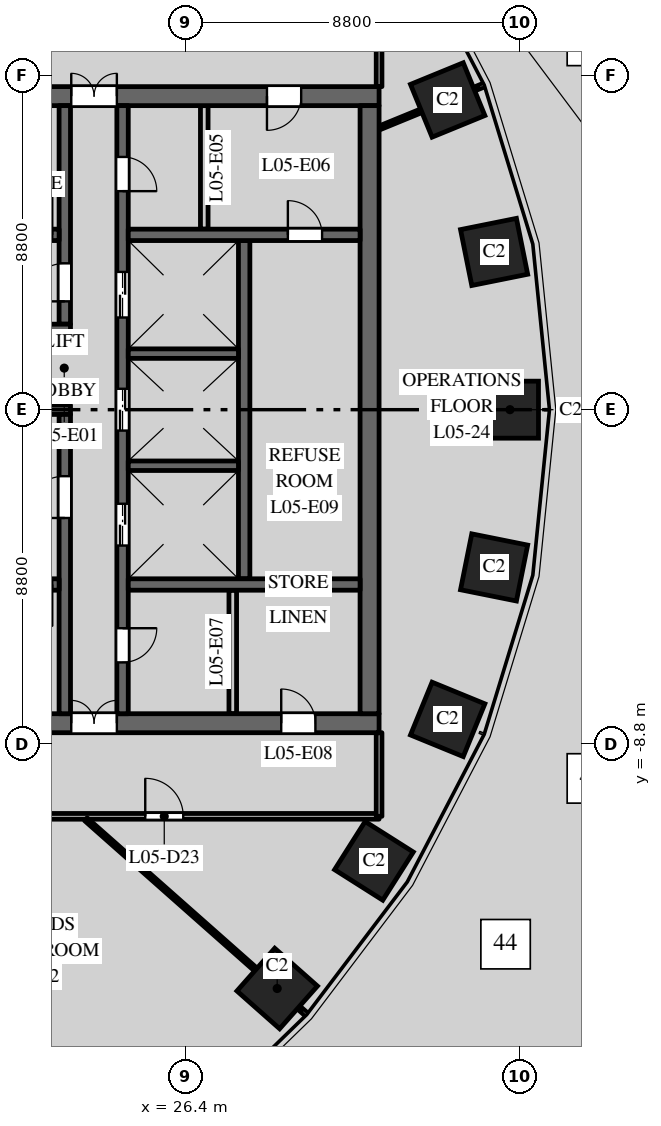
"""IFC4 building model, lengths in metres.
Left out: names, types, materials, properties, quantities, classifications, styles, units other than length and angle.
Written with IfcOpenShell. Run it as: python <this file> out.ifc"""

import sys

from ifc_helpers import new_model, si_unit, direction, frame, frame_2d, origin, origin_2d, place, context, subcontext, project, spatial, rectangle, extrude, element, fill, save


model = new_model("IFC4")
c1 = context("Model", 3, precision=1e-05, world=origin(), true_north=direction((0.0, 1.0)))
c2 = subcontext(c1, "Body", "Model", "MODEL_VIEW")
j1 = project(units=[si_unit("LENGTHUNIT", "METRE"), si_unit("PLANEANGLEUNIT", "RADIAN")], contexts=[c1])
p1 = place(None, origin())
s1 = spatial("IfcSite", under=j1, at=p1, CompositionType="ELEMENT")
p2 = place(p1, origin())
s2 = spatial("IfcBuilding", under=s1, at=p2, CompositionType="ELEMENT")
p3 = place(p2, frame((0.0, 0.0, 30.5)))
s3 = spatial("IfcBuildingStorey", under=s2, at=p3, CompositionType="ELEMENT", Elevation=30.5)
for number, where, z_axis, x_axis in (
    (1, (34.945, 0.0, 0.0), (0.0, 0.0, 1.0), (0.0, 1.0, 0.0)),
    (2, (34.527, 4.151, 0.0), (0.0, 0.0, 1.0), (-0.197, 0.98, 0.0)),
    (3, (33.305, 8.149, 0.0), (0.0, 0.0, 1.0), (-0.379, 0.925, 0.0)),
    (4, (28.819, -15.23, 0.0), (0.0, 0.0, 1.0), (0.663, 0.749, 0.0)),
    (5, (31.365, -11.871, 0.0), (0.0, 0.0, 1.0), (0.535, 0.845, 0.0)),
    (6, (33.305, -8.149, 0.0), (0.0, 0.0, 1.0), (0.379, 0.925, 0.0)),
    (7, (34.527, -4.151, 0.0), (0.0, 0.0, 1.0), (0.197, 0.98, 0.0)),
):
    element("IfcColumn", number, at=place(p3, frame(where, z_axis=z_axis, x_axis=x_axis)), inside=s3, PredefinedType="COLUMN", context=c2, shape_type="SweptSolid", body=[
        extrude(rectangle(XDim=1.5, YDim=1.5, at=origin_2d()), origin(), (0.0, 0.0, 1.0), 4.0),
    ])
p4 = place(p3, frame((16.5, 8.25, 0.0), z_axis=(0.0, 0.0, 1.0), x_axis=(1.0, 0.0, 0.0)))
e8 = element("IfcWall", 8, at=p4, inside=s3, PredefinedType="SHEAR", context=c2, shape_type="SweptSolid", body=[
    extrude(rectangle(XDim=15.0, YDim=0.5, at=frame_2d((7.5, 0.0))), origin(), (0.0, 0.0, 1.0), 3.7),
])
p5 = place(p4, frame((6.9, 0.0, 0.0)))
e9 = element("IfcOpeningElement", 9, at=p5, cuts=e8, PredefinedType="OPENING", context=c2, shape_type="SweptSolid", body=[
    extrude(rectangle(XDim=1.2, YDim=2.1, at=frame_2d((0.6, 1.05))), frame((0.0, 0.26, 0.0), z_axis=(0.0, -1.0, 0.0), x_axis=(1.0, 0.0, 0.0)), (0.0, 0.0, 1.0), 0.52),
])
p6 = place(p4, frame((12.05, 0.0, 0.0)))
e10 = element("IfcOpeningElement", 10, at=p6, cuts=e8, PredefinedType="OPENING", context=c2, shape_type="SweptSolid", body=[
    extrude(rectangle(XDim=0.9, YDim=2.1, at=frame_2d((0.45, 1.05))), frame((0.0, 0.26, 0.0), z_axis=(0.0, -1.0, 0.0), x_axis=(1.0, 0.0, 0.0)), (0.0, 0.0, 1.0), 0.52),
])
p7 = place(p3, frame((16.5, -8.25, 0.0), z_axis=(0.0, 0.0, 1.0), x_axis=(1.0, 0.0, 0.0)))
e11 = element("IfcWall", 11, at=p7, inside=s3, PredefinedType="SHEAR", context=c2, shape_type="SweptSolid", body=[
    extrude(rectangle(XDim=15.0, YDim=0.5, at=frame_2d((7.5, 0.0))), origin(), (0.0, 0.0, 1.0), 3.7),
])
p8 = place(p7, frame((6.9, 0.0, 0.0)))
e12 = element("IfcOpeningElement", 12, at=p8, cuts=e11, PredefinedType="OPENING", context=c2, shape_type="SweptSolid", body=[
    extrude(rectangle(XDim=1.2, YDim=2.1, at=frame_2d((0.6, 1.05))), frame((0.0, 0.26, 0.0), z_axis=(0.0, -1.0, 0.0), x_axis=(1.0, 0.0, 0.0)), (0.0, 0.0, 1.0), 0.52),
])
p9 = place(p7, frame((12.425, 0.0, 0.0)))
e13 = element("IfcOpeningElement", 13, at=p9, cuts=e11, PredefinedType="OPENING", context=c2, shape_type="SweptSolid", body=[
    extrude(rectangle(XDim=0.9, YDim=2.1, at=frame_2d((0.45, 1.05))), frame((0.0, 0.26, 0.0), z_axis=(0.0, -1.0, 0.0), x_axis=(1.0, 0.0, 0.0)), (0.0, 0.0, 1.0), 0.52),
])
p10 = place(p3, frame((27.95, -4.45, 0.0), z_axis=(0.0, 0.0, 1.0), x_axis=(0.0, 1.0, 0.0)))
e14 = element("IfcWall", 14, at=p10, inside=s3, PredefinedType="SHEAR", context=c2, shape_type="SweptSolid", body=[
    extrude(rectangle(XDim=8.9, YDim=0.3, at=frame_2d((4.45, 0.0))), origin(), (0.0, 0.0, 1.0), 3.7),
])
p11 = place(p3, frame((24.75, -8.0, 0.0), z_axis=(0.0, 0.0, 1.0), x_axis=(0.0, 1.0, 0.0)))
e15 = element("IfcWall", 15, at=p11, inside=s3, PredefinedType="SHEAR", context=c2, shape_type="SweptSolid", body=[
    extrude(rectangle(XDim=16.0, YDim=0.3, at=frame_2d((8.0, 0.0))), origin(), (0.0, 0.0, 1.0), 3.7),
])
p12 = place(p11, frame((4.425, 0.0, 0.0)))
e16 = element("IfcOpeningElement", 16, at=p12, cuts=e15, PredefinedType="OPENING", context=c2, shape_type="SweptSolid", body=[
    extrude(rectangle(XDim=1.1, YDim=2.1, at=frame_2d((0.55, 1.05))), frame((0.0, 0.16, 0.0), z_axis=(0.0, -1.0, 0.0), x_axis=(1.0, 0.0, 0.0)), (0.0, 0.0, 1.0), 0.32),
])
p13 = place(p11, frame((7.45, 0.0, 0.0)))
e17 = element("IfcOpeningElement", 17, at=p13, cuts=e15, PredefinedType="OPENING", context=c2, shape_type="SweptSolid", body=[
    extrude(rectangle(XDim=1.1, YDim=2.1, at=frame_2d((0.55, 1.05))), frame((0.0, 0.16, 0.0), z_axis=(0.0, -1.0, 0.0), x_axis=(1.0, 0.0, 0.0)), (0.0, 0.0, 1.0), 0.32),
])
p14 = place(p11, frame((10.425, 0.0, 0.0)))
e18 = element("IfcOpeningElement", 18, at=p14, cuts=e15, PredefinedType="OPENING", context=c2, shape_type="SweptSolid", body=[
    extrude(rectangle(XDim=1.2, YDim=2.1, at=frame_2d((0.6, 1.05))), frame((0.0, 0.16, 0.0), z_axis=(0.0, -1.0, 0.0), x_axis=(1.0, 0.0, 0.0)), (0.0, 0.0, 1.0), 0.32),
])
p15 = place(p11, frame((13.75, 0.0, 0.0)))
e19 = element("IfcOpeningElement", 19, at=p15, cuts=e15, PredefinedType="OPENING", context=c2, shape_type="SweptSolid", body=[
    extrude(rectangle(XDim=0.9, YDim=2.1, at=frame_2d((0.45, 1.05))), frame((0.0, 0.16, 0.0), z_axis=(0.0, -1.0, 0.0), x_axis=(1.0, 0.0, 0.0)), (0.0, 0.0, 1.0), 0.32),
])
p16 = place(p11, frame((1.35, 0.0, 0.0)))
e20 = element("IfcOpeningElement", 20, at=p16, cuts=e15, PredefinedType="OPENING", context=c2, shape_type="SweptSolid", body=[
    extrude(rectangle(XDim=0.9, YDim=2.1, at=frame_2d((0.45, 1.05))), frame((0.0, 0.16, 0.0), z_axis=(0.0, -1.0, 0.0), x_axis=(1.0, 0.0, 0.0)), (0.0, 0.0, 1.0), 0.32),
])
p17 = place(p3, frame((20.1, 0.0, 0.0), z_axis=(0.0, 0.0, 1.0), x_axis=(1.0, 0.0, 0.0)))
e21 = element("IfcWall", 21, at=p17, inside=s3, PredefinedType="SHEAR", context=c2, shape_type="SweptSolid", body=[
    extrude(rectangle(XDim=3.28, YDim=0.25, at=frame_2d((1.64, 0.0))), origin(), (0.0, 0.0, 1.0), 3.7),
])
p18 = place(p3, frame((31.25, -8.0, 0.0), z_axis=(0.0, 0.0, 1.0), x_axis=(0.0, 1.0, 0.0)))
e22 = element("IfcWall", 22, at=p18, inside=s3, PredefinedType="SHEAR", context=c2, shape_type="SweptSolid", body=[
    extrude(rectangle(XDim=16.0, YDim=0.5, at=frame_2d((8.0, 0.0))), origin(), (0.0, 0.0, 1.0), 3.7),
])
p19 = place(p3, frame((24.9, 4.6, 0.0), z_axis=(0.0, 0.0, 1.0), x_axis=(1.0, 0.0, 0.0)))
e23 = element("IfcWall", 23, at=p19, inside=s3, PredefinedType="SHEAR", context=c2, shape_type="SweptSolid", body=[
    extrude(rectangle(XDim=6.1, YDim=0.3, at=frame_2d((3.05, 0.0))), origin(), (0.0, 0.0, 1.0), 3.7),
])
p20 = place(p19, frame((4.2, 0.0, 0.0)))
e24 = element("IfcOpeningElement", 24, at=p20, cuts=e23, PredefinedType="OPENING", context=c2, shape_type="SweptSolid", body=[
    extrude(rectangle(XDim=0.9, YDim=2.1, at=frame_2d((0.45, 1.05))), frame((0.0, 0.16, 0.0), z_axis=(0.0, -1.0, 0.0), x_axis=(1.0, 0.0, 0.0)), (0.0, 0.0, 1.0), 0.32),
])
for number, where, z_axis, x_axis in (
    (25, (26.9, 4.75, 0.0), (0.0, 0.0, 1.0), (0.0, 1.0, 0.0)),
    (26, (27.65, -8.0, 0.0), (0.0, 0.0, 1.0), (0.0, 1.0, 0.0)),
):
    element("IfcWall", number, at=place(p3, frame(where, z_axis=z_axis, x_axis=x_axis)), inside=s3, PredefinedType="PARTITIONING", context=c2, shape_type="SweptSolid", body=[
        extrude(rectangle(XDim=3.25, YDim=0.2, at=frame_2d((1.625, 0.0))), origin(), (0.0, 0.0, 1.0), 3.7),
    ])
p21 = place(p3, frame((24.9, -4.6, 0.0), z_axis=(0.0, 0.0, 1.0), x_axis=(1.0, 0.0, 0.0)))
e27 = element("IfcWall", 27, at=p21, inside=s3, PredefinedType="SHEAR", context=c2, shape_type="SweptSolid", body=[
    extrude(rectangle(XDim=6.1, YDim=0.3, at=frame_2d((3.05, 0.0))), origin(), (0.0, 0.0, 1.0), 3.7),
])
for number, where, z_axis, x_axis in (
    (28, (24.9, -1.475, 0.0), (0.0, 0.0, 1.0), (1.0, 0.0, 0.0)),
    (29, (24.9, 1.475, 0.0), (0.0, 0.0, 1.0), (1.0, 0.0, 0.0)),
):
    element("IfcWall", number, at=place(p3, frame(where, z_axis=z_axis, x_axis=x_axis)), inside=s3, PredefinedType="SHEAR", context=c2, shape_type="SweptSolid", body=[
        extrude(rectangle(XDim=2.9, YDim=0.25, at=frame_2d((1.45, 0.0))), origin(), (0.0, 0.0, 1.0), 3.7),
    ])
p22 = place(p3, frame((23.23, 2.25, 0.0), z_axis=(0.0, 0.0, 1.0), x_axis=(0.0, 1.0, 0.0)))
e30 = element("IfcWall", 30, at=p22, inside=s3, PredefinedType="SHEAR", context=c2, shape_type="SweptSolid", body=[
    extrude(rectangle(XDim=5.75, YDim=0.3, at=frame_2d((2.875, 0.0))), origin(), (0.0, 0.0, 1.0), 3.7),
])
p23 = place(p22, frame((0.6, 0.0, 0.0)))
e31 = element("IfcOpeningElement", 31, at=p23, cuts=e30, PredefinedType="OPENING", context=c2, shape_type="SweptSolid", body=[
    extrude(rectangle(XDim=1.0, YDim=2.1, at=frame_2d((0.5, 1.05))), frame((0.0, 0.16, 0.0), z_axis=(0.0, -1.0, 0.0), x_axis=(1.0, 0.0, 0.0)), (0.0, 0.0, 1.0), 0.32),
])
p24 = place(p3, frame((23.23, -8.0, 0.0), z_axis=(0.0, 0.0, 1.0), x_axis=(0.0, 1.0, 0.0)))
e32 = element("IfcWall", 32, at=p24, inside=s3, PredefinedType="SHEAR", context=c2, shape_type="SweptSolid", body=[
    extrude(rectangle(XDim=7.875, YDim=0.3, at=frame_2d((3.938, 0.0))), origin(), (0.0, 0.0, 1.0), 3.7),
])
p25 = place(p24, frame((5.15, 0.0, 0.0)))
e33 = element("IfcOpeningElement", 33, at=p25, cuts=e32, PredefinedType="OPENING", context=c2, shape_type="SweptSolid", body=[
    extrude(rectangle(XDim=1.1, YDim=2.1, at=frame_2d((0.55, 1.05))), frame((0.0, 0.16, 0.0), z_axis=(0.0, -1.0, 0.0), x_axis=(1.0, 0.0, 0.0)), (0.0, 0.0, 1.0), 0.32),
])
p26 = place(p3, frame((16.9, 4.6, 0.0), z_axis=(0.0, 0.0, 1.0), x_axis=(1.0, 0.0, 0.0)))
e34 = element("IfcWall", 34, at=p26, inside=s3, PredefinedType="SHEAR", context=c2, shape_type="SweptSolid", body=[
    extrude(rectangle(XDim=6.18, YDim=0.3, at=frame_2d((3.09, 0.0))), origin(), (0.0, 0.0, 1.0), 3.7),
])
p27 = place(p26, frame((4.9, 0.0, 0.0)))
e35 = element("IfcOpeningElement", 35, at=p27, cuts=e34, PredefinedType="OPENING", context=c2, shape_type="SweptSolid", body=[
    extrude(rectangle(XDim=1.1, YDim=2.1, at=frame_2d((0.55, 1.05))), frame((0.0, 0.16, 0.0), z_axis=(0.0, -1.0, 0.0), x_axis=(1.0, 0.0, 0.0)), (0.0, 0.0, 1.0), 0.32),
])
p28 = place(p3, frame((16.9, -4.6, 0.0), z_axis=(0.0, 0.0, 1.0), x_axis=(1.0, 0.0, 0.0)))
e36 = element("IfcWall", 36, at=p28, inside=s3, PredefinedType="SHEAR", context=c2, shape_type="SweptSolid", body=[
    extrude(rectangle(XDim=6.18, YDim=0.3, at=frame_2d((3.09, 0.0))), origin(), (0.0, 0.0, 1.0), 3.7),
])
p29 = place(p28, frame((4.9, 0.0, 0.0)))
e37 = element("IfcOpeningElement", 37, at=p29, cuts=e36, PredefinedType="OPENING", context=c2, shape_type="SweptSolid", body=[
    extrude(rectangle(XDim=1.1, YDim=2.1, at=frame_2d((0.55, 1.05))), frame((0.0, 0.16, 0.0), z_axis=(0.0, -1.0, 0.0), x_axis=(1.0, 0.0, 0.0)), (0.0, 0.0, 1.0), 0.32),
])
p30 = place(p3, frame((20.85, 2.125, 0.0), z_axis=(0.0, 0.0, 1.0), x_axis=(1.0, 0.0, 0.0)))
e38 = element("IfcWall", 38, at=p30, inside=s3, PredefinedType="SHEAR", context=c2, shape_type="SweptSolid", body=[
    extrude(rectangle(XDim=2.53, YDim=0.25, at=frame_2d((1.265, 0.0))), origin(), (0.0, 0.0, 1.0), 3.7),
])
p31 = place(p3, frame((16.575, -11.733, 0.0), z_axis=(0.0, 0.0, 1.0), x_axis=(0.54222594427, -0.840232720953, 0.0)))
e39 = element("IfcWall", 39, at=p31, inside=s3, PredefinedType="PARTITIONING", context=c2, shape_type="SweptSolid", body=[
    extrude(rectangle(XDim=11.674, YDim=0.1, at=frame_2d((5.837, 0.0))), origin(), (0.0, 0.0, 1.0), 3.7),
])
p32 = place(p3, frame((16.5, -10.7, 0.0), z_axis=(0.0, 0.0, 1.0), x_axis=(1.0, 0.0, 0.0)))
e40 = element("IfcWall", 40, at=p32, inside=s3, PredefinedType="PARTITIONING", context=c2, shape_type="SweptSolid", body=[
    extrude(rectangle(XDim=15.0, YDim=0.15, at=frame_2d((7.5, 0.0))), origin(), (0.0, 0.0, 1.0), 2.75),
])
p33 = place(p32, frame((0.65, 0.0, 0.0)))
e41 = element("IfcOpeningElement", 41, at=p33, cuts=e40, PredefinedType="OPENING", context=c2, shape_type="SweptSolid", body=[
    extrude(rectangle(XDim=1.0, YDim=2.1, at=frame_2d((0.5, 1.05))), frame((0.0, 0.085, 0.0), z_axis=(0.0, -1.0, 0.0), x_axis=(1.0, 0.0, 0.0)), (0.0, 0.0, 1.0), 0.17),
])
p34 = place(p32, frame((8.847, 0.0, 0.0)))
e42 = element("IfcOpeningElement", 42, at=p34, cuts=e40, PredefinedType="OPENING", context=c2, shape_type="SweptSolid", body=[
    extrude(rectangle(XDim=1.0, YDim=2.1, at=frame_2d((0.5, 1.05))), frame((0.0, 0.085, 0.0), z_axis=(0.0, -1.0, 0.0), x_axis=(1.0, 0.0, 0.0)), (0.0, 0.0, 1.0), 0.17),
])
p35 = place(p3, frame((23.785, -10.778, 0.0), z_axis=(0.0, 0.0, 1.0), x_axis=(0.748985701008, -0.662586160198, 0.0)))
e43 = element("IfcWall", 43, at=p35, inside=s3, PredefinedType="PARTITIONING", context=c2, shape_type="SweptSolid", body=[
    extrude(rectangle(XDim=7.723, YDim=0.1, at=frame_2d((3.861, 0.0))), origin(), (0.0, 0.0, 1.0), 3.7),
])
p36 = place(p3, frame((31.5, -10.7, 0.0), z_axis=(0.0, 0.0, 1.0), x_axis=(0.0, 1.0, 0.0)))
e44 = element("IfcWall", 44, at=p36, inside=s3, PredefinedType="PARTITIONING", context=c2, shape_type="SweptSolid", body=[
    extrude(rectangle(XDim=2.2, YDim=0.15, at=frame_2d((1.1, 0.0))), origin(), (0.0, 0.0, 1.0), 2.85),
])
p37 = place(p3, frame((31.5, 7.41, 0.0), z_axis=(0.0, 0.0, 1.0), x_axis=(0.925344112436, 0.379128307542, 0.0)))
e45 = element("IfcWall", 45, at=p37, inside=s3, PredefinedType="PARTITIONING", context=c2, shape_type="SweptSolid", body=[
    extrude(rectangle(XDim=2.954, YDim=0.1, at=frame_2d((1.477, 0.0))), origin(), (0.0, 0.0, 1.0), 3.7),
])
p38 = place(p3, frame((31.5, 8.5, 0.0), z_axis=(0.0, 0.0, 1.0), x_axis=(0.0, 1.0, 0.0)))
e46 = element("IfcWall", 46, at=p38, inside=s3, PredefinedType="PARTITIONING", context=c2, shape_type="SweptSolid", body=[
    extrude(rectangle(XDim=2.2, YDim=0.15, at=frame_2d((1.1, 0.0))), origin(), (0.0, 0.0, 1.0), 2.85),
])
p39 = place(p12, origin())
e47 = element("IfcDoor", 47, at=p39, inside=s3, OperationType="DOUBLE_DOOR_SLIDING", PredefinedType="DOOR", context=c2, shape_type="SweptSolid", body=[
    extrude(rectangle(XDim=1.1, YDim=2.1, at=frame_2d((0.55, 1.05))), frame((0.0, 0.025, 0.0), z_axis=(0.0, -1.0, 0.0), x_axis=(1.0, 0.0, 0.0)), (0.0, 0.0, 1.0), 0.05),
])
fill(e16, e47)
p40 = place(p13, origin())
e48 = element("IfcDoor", 48, at=p40, inside=s3, OperationType="DOUBLE_DOOR_SLIDING", PredefinedType="DOOR", context=c2, shape_type="SweptSolid", body=[
    extrude(rectangle(XDim=1.1, YDim=2.1, at=frame_2d((0.55, 1.05))), frame((0.0, 0.025, 0.0), z_axis=(0.0, -1.0, 0.0), x_axis=(1.0, 0.0, 0.0)), (0.0, 0.0, 1.0), 0.05),
])
fill(e17, e48)
p41 = place(p14, origin())
e49 = element("IfcDoor", 49, at=p41, inside=s3, OperationType="DOUBLE_DOOR_SLIDING", PredefinedType="DOOR", context=c2, shape_type="SweptSolid", body=[
    extrude(rectangle(XDim=1.2, YDim=2.1, at=frame_2d((0.6, 1.05))), frame((0.0, 0.025, 0.0), z_axis=(0.0, -1.0, 0.0), x_axis=(1.0, 0.0, 0.0)), (0.0, 0.0, 1.0), 0.05),
])
fill(e18, e49)
p42 = place(p27, origin())
e50 = element("IfcDoor", 50, at=p42, inside=s3, OperationType="SINGLE_SWING_LEFT", PredefinedType="DOOR", context=c2, shape_type="SweptSolid", body=[
    extrude(rectangle(XDim=1.1, YDim=2.1, at=frame_2d((0.55, 1.05))), frame((0.0, 0.025, 0.0), z_axis=(0.0, -1.0, 0.0), x_axis=(1.0, 0.0, 0.0)), (0.0, 0.0, 1.0), 0.05),
])
fill(e35, e50)
p43 = place(p29, origin())
e51 = element("IfcDoor", 51, at=p43, inside=s3, OperationType="SINGLE_SWING_RIGHT", PredefinedType="DOOR", context=c2, shape_type="SweptSolid", body=[
    extrude(rectangle(XDim=1.1, YDim=2.1, at=frame_2d((0.55, 1.05))), frame((0.0, 0.025, 0.0), z_axis=(0.0, -1.0, 0.0), x_axis=(1.0, 0.0, 0.0)), (0.0, 0.0, 1.0), 0.05),
])
fill(e37, e51)
p44 = place(p25, origin())
e52 = element("IfcDoor", 52, at=p44, inside=s3, OperationType="SINGLE_SWING_RIGHT", PredefinedType="DOOR", context=c2, shape_type="SweptSolid", body=[
    extrude(rectangle(XDim=1.1, YDim=2.1, at=frame_2d((0.55, 1.05))), frame((0.0, 0.025, 0.0), z_axis=(0.0, -1.0, 0.0), x_axis=(1.0, 0.0, 0.0)), (0.0, 0.0, 1.0), 0.05),
])
fill(e33, e52)
p45 = place(p23, origin())
e53 = element("IfcDoor", 53, at=p45, inside=s3, OperationType="SINGLE_SWING_RIGHT", PredefinedType="DOOR", context=c2, shape_type="SweptSolid", body=[
    extrude(rectangle(XDim=1.0, YDim=2.1, at=frame_2d((0.5, 1.05))), frame((0.0, 0.025, 0.0), z_axis=(0.0, -1.0, 0.0), x_axis=(1.0, 0.0, 0.0)), (0.0, 0.0, 1.0), 0.05),
])
fill(e31, e53)
p46 = place(p5, origin())
e54 = element("IfcDoor", 54, at=p46, inside=s3, OperationType="DOUBLE_DOOR_DOUBLE_SWING", PredefinedType="DOOR", context=c2, shape_type="SweptSolid", body=[
    extrude(rectangle(XDim=1.2, YDim=2.1, at=frame_2d((0.6, 1.05))), frame((0.0, 0.025, 0.0), z_axis=(0.0, -1.0, 0.0), x_axis=(1.0, 0.0, 0.0)), (0.0, 0.0, 1.0), 0.05),
])
fill(e9, e54)
p47 = place(p8, origin())
e55 = element("IfcDoor", 55, at=p47, inside=s3, OperationType="DOUBLE_DOOR_DOUBLE_SWING", PredefinedType="DOOR", context=c2, shape_type="SweptSolid", body=[
    extrude(rectangle(XDim=1.2, YDim=2.1, at=frame_2d((0.6, 1.05))), frame((0.0, 0.025, 0.0), z_axis=(0.0, -1.0, 0.0), x_axis=(1.0, 0.0, 0.0)), (0.0, 0.0, 1.0), 0.05),
])
fill(e12, e55)
p48 = place(p15, origin())
e56 = element("IfcDoor", 56, at=p48, inside=s3, OperationType="SINGLE_SWING_LEFT", PredefinedType="DOOR", context=c2, shape_type="SweptSolid", body=[
    extrude(rectangle(XDim=0.9, YDim=2.1, at=frame_2d((0.45, 1.05))), frame((0.0, 0.025, 0.0), z_axis=(0.0, -1.0, 0.0), x_axis=(1.0, 0.0, 0.0)), (0.0, 0.0, 1.0), 0.05),
])
fill(e19, e56)
p49 = place(p6, origin())
e57 = element("IfcDoor", 57, at=p49, inside=s3, OperationType="SINGLE_SWING_LEFT", PredefinedType="DOOR", context=c2, shape_type="SweptSolid", body=[
    extrude(rectangle(XDim=0.9, YDim=2.1, at=frame_2d((0.45, 1.05))), frame((0.0, 0.025, 0.0), z_axis=(0.0, -1.0, 0.0), x_axis=(1.0, 0.0, 0.0)), (0.0, 0.0, 1.0), 0.05),
])
fill(e10, e57)
p50 = place(p16, origin())
e58 = element("IfcDoor", 58, at=p50, inside=s3, OperationType="SINGLE_SWING_RIGHT", PredefinedType="DOOR", context=c2, shape_type="SweptSolid", body=[
    extrude(rectangle(XDim=0.9, YDim=2.1, at=frame_2d((0.45, 1.05))), frame((0.0, 0.025, 0.0), z_axis=(0.0, -1.0, 0.0), x_axis=(1.0, 0.0, 0.0)), (0.0, 0.0, 1.0), 0.05),
])
fill(e20, e58)
p51 = place(p9, origin())
e59 = element("IfcDoor", 59, at=p51, inside=s3, OperationType="SINGLE_SWING_RIGHT", PredefinedType="DOOR", context=c2, shape_type="SweptSolid", body=[
    extrude(rectangle(XDim=0.9, YDim=2.1, at=frame_2d((0.45, 1.05))), frame((0.0, 0.025, 0.0), z_axis=(0.0, -1.0, 0.0), x_axis=(1.0, 0.0, 0.0)), (0.0, 0.0, 1.0), 0.05),
])
fill(e13, e59)
p52 = place(p20, origin())
e60 = element("IfcDoor", 60, at=p52, inside=s3, OperationType="SINGLE_SWING_RIGHT", PredefinedType="DOOR", context=c2, shape_type="SweptSolid", body=[
    extrude(rectangle(XDim=0.9, YDim=2.1, at=frame_2d((0.45, 1.05))), frame((0.0, 0.025, 0.0), z_axis=(0.0, -1.0, 0.0), x_axis=(1.0, 0.0, 0.0)), (0.0, 0.0, 1.0), 0.05),
])
fill(e24, e60)
p53 = place(p34, origin())
e61 = element("IfcDoor", 61, at=p53, inside=s3, OperationType="SINGLE_SWING_LEFT", PredefinedType="DOOR", context=c2, shape_type="SweptSolid", body=[
    extrude(rectangle(XDim=1.0, YDim=2.1, at=frame_2d((0.5, 1.05))), frame((0.0, 0.025, 0.0), z_axis=(0.0, -1.0, 0.0), x_axis=(1.0, 0.0, 0.0)), (0.0, 0.0, 1.0), 0.05),
])
fill(e42, e61)
save(model, sys.argv[1])
